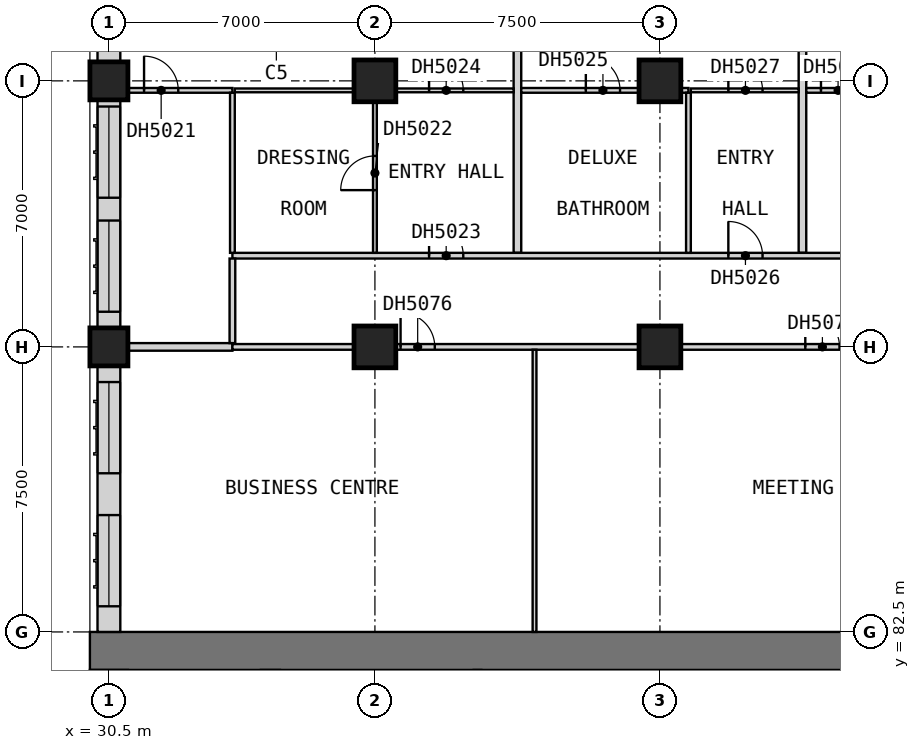
"""IFC4 building model, lengths in metres.
Left out: names, types, materials, properties, quantities, classifications, styles, units other than length and angle.
Written with IfcOpenShell. Run it as: python <this file> out.ifc"""

import sys

from ifc_helpers import new_model, si_unit, direction, frame, frame_2d, origin, origin_2d, place, context, subcontext, project, spatial, rectangle, extrude, element, fill, save


model = new_model("IFC4")
c1 = context("Model", 3, precision=1e-05, world=origin(), true_north=direction((0.0, 1.0)))
c2 = subcontext(c1, "Body", "Model", "MODEL_VIEW")
j1 = project(units=[si_unit("LENGTHUNIT", "METRE"), si_unit("PLANEANGLEUNIT", "RADIAN")], contexts=[c1])
p1 = place(None, origin())
s1 = spatial("IfcSite", under=j1, at=p1, CompositionType="ELEMENT")
p2 = place(p1, origin())
s2 = spatial("IfcBuilding", under=s1, at=p2, CompositionType="ELEMENT")
p3 = place(p2, frame((0.0, 0.0, 79.1)))
s3 = spatial("IfcBuildingStorey", under=s2, at=p3, CompositionType="ELEMENT", Elevation=79.1)
for number, where, z_axis, x_axis in (
    (1, (30.5, 90.0, 0.0), (0.0, 0.0, 1.0), (1.0, 0.0, 0.0)),
    (2, (30.5, 97.0, 0.0), (0.0, 0.0, 1.0), (1.0, 0.0, 0.0)),
):
    element("IfcColumn", number, at=place(p3, frame(where, z_axis=z_axis, x_axis=x_axis)), inside=s3, PredefinedType="COLUMN", context=c2, shape_type="SweptSolid", body=[
        extrude(rectangle(XDim=1.0, YDim=1.0, at=origin_2d()), origin(), (0.0, 0.0, 1.0), 3.6),
    ])
for number, where, z_axis, x_axis in (
    (3, (37.5, 90.0, 0.0), (0.0, 0.0, 1.0), (1.0, 0.0, 0.0)),
    (4, (37.5, 97.0, 0.0), (0.0, 0.0, 1.0), (1.0, 0.0, 0.0)),
    (5, (45.0, 90.0, 0.0), (0.0, 0.0, 1.0), (1.0, 0.0, 0.0)),
    (6, (45.0, 97.0, 0.0), (0.0, 0.0, 1.0), (1.0, 0.0, 0.0)),
):
    element("IfcColumn", number, at=place(p3, frame(where, z_axis=z_axis, x_axis=x_axis)), inside=s3, PredefinedType="COLUMN", context=c2, shape_type="SweptSolid", body=[
        extrude(rectangle(XDim=1.1, YDim=1.1, at=origin_2d()), origin(), (0.0, 0.0, 1.0), 3.6),
    ])
p4 = place(p3, frame((30.0, 82.0, 0.0), z_axis=(0.0, 0.0, 1.0), x_axis=(1.0, 0.0, 0.0)))
e7 = element("IfcWall", 7, at=p4, inside=s3, PredefinedType="SHEAR", context=c2, shape_type="SweptSolid", body=[
    extrude(rectangle(XDim=30.0, YDim=1.0, at=frame_2d((15.0, 0.0))), origin(), (0.0, 0.0, 1.0), 3.6),
])
p5 = place(p3, frame((34.75, 78.3, 0.0), z_axis=(0.0, 0.0, 1.0), x_axis=(0.0, 1.0, 0.0)))
e8 = element("IfcWall", 8, at=p5, inside=s3, PredefinedType="SHEAR", context=c2, shape_type="SweptSolid", body=[
    extrude(rectangle(XDim=3.2, YDim=0.5, at=frame_2d((1.6, 0.0))), origin(), (0.0, 0.0, 1.0), 3.6),
])
p6 = place(p3, frame((30.5, 102.0, 0.0), z_axis=(0.0, 0.0, 1.0), x_axis=(0.0, -1.0, 0.0)))
e9 = element("IfcWall", 9, at=p6, inside=s3, PredefinedType="SOLIDWALL", context=c2, shape_type="SweptSolid", body=[
    extrude(rectangle(XDim=4.5, YDim=0.6, at=frame_2d((2.25, 0.0))), origin(), (0.0, 0.0, 1.0), 2.85),
])
p7 = place(p6, frame((1.5, 0.0, 0.8)))
e10 = element("IfcOpeningElement", 10, at=p7, cuts=e9, PredefinedType="OPENING", context=c2, shape_type="SweptSolid", body=[
    extrude(rectangle(XDim=2.4, YDim=1.8, at=frame_2d((1.2, 0.9))), frame((0.0, 0.31, 0.0), z_axis=(0.0, -1.0, 0.0), x_axis=(1.0, 0.0, 0.0)), (0.0, 0.0, 1.0), 0.62),
])
p8 = place(p3, frame((30.5, 96.5, 0.0), z_axis=(0.0, 0.0, 1.0), x_axis=(0.0, -1.0, 0.0)))
e11 = element("IfcWall", 11, at=p8, inside=s3, PredefinedType="SOLIDWALL", context=c2, shape_type="SweptSolid", body=[
    extrude(rectangle(XDim=6.0, YDim=0.6, at=frame_2d((3.0, 0.0))), origin(), (0.0, 0.0, 1.0), 2.85),
])
p9 = place(p8, frame((3.175, 0.0, 0.8)))
e12 = element("IfcOpeningElement", 12, at=p9, cuts=e11, PredefinedType="OPENING", context=c2, shape_type="SweptSolid", body=[
    extrude(rectangle(XDim=2.4, YDim=1.8, at=frame_2d((1.2, 0.9))), frame((0.0, 0.31, 0.0), z_axis=(0.0, -1.0, 0.0), x_axis=(1.0, 0.0, 0.0)), (0.0, 0.0, 1.0), 0.62),
])
p10 = place(p8, frame((0.175, 0.0, 0.8)))
e13 = element("IfcOpeningElement", 13, at=p10, cuts=e11, PredefinedType="OPENING", context=c2, shape_type="SweptSolid", body=[
    extrude(rectangle(XDim=2.4, YDim=1.8, at=frame_2d((1.2, 0.9))), frame((0.0, 0.31, 0.0), z_axis=(0.0, -1.0, 0.0), x_axis=(1.0, 0.0, 0.0)), (0.0, 0.0, 1.0), 0.62),
])
p11 = place(p3, frame((30.5, 89.5, 0.0), z_axis=(0.0, 0.0, 1.0), x_axis=(0.0, -1.0, 0.0)))
e14 = element("IfcWall", 14, at=p11, inside=s3, PredefinedType="SOLIDWALL", context=c2, shape_type="SweptSolid", body=[
    extrude(rectangle(XDim=7.0, YDim=0.6, at=frame_2d((3.5, 0.0))), origin(), (0.0, 0.0, 1.0), 3.35),
])
p12 = place(p11, frame((3.925, 0.0, 0.8)))
e15 = element("IfcOpeningElement", 15, at=p12, cuts=e14, PredefinedType="OPENING", context=c2, shape_type="SweptSolid", body=[
    extrude(rectangle(XDim=2.4, YDim=1.8, at=frame_2d((1.2, 0.9))), frame((0.0, 0.31, 0.0), z_axis=(0.0, -1.0, 0.0), x_axis=(1.0, 0.0, 0.0)), (0.0, 0.0, 1.0), 0.62),
])
p13 = place(p11, frame((0.425, 0.0, 0.8)))
e16 = element("IfcOpeningElement", 16, at=p13, cuts=e14, PredefinedType="OPENING", context=c2, shape_type="SweptSolid", body=[
    extrude(rectangle(XDim=2.4, YDim=1.8, at=frame_2d((1.2, 0.9))), frame((0.0, 0.31, 0.0), z_axis=(0.0, -1.0, 0.0), x_axis=(1.0, 0.0, 0.0)), (0.0, 0.0, 1.0), 0.62),
])
p14 = place(p3, frame((30.0, 90.0, 0.0), z_axis=(0.0, 0.0, 1.0), x_axis=(1.0, 0.0, 0.0)))
e17 = element("IfcWall", 17, at=p14, inside=s3, PredefinedType="PARTITIONING", context=c2, shape_type="SweptSolid", body=[
    extrude(rectangle(XDim=3.75, YDim=0.2, at=frame_2d((1.875, 0.0))), origin(), (0.0, 0.0, 1.0), 3.35),
])
for number, where, z_axis, x_axis in (
    (18, (41.25, 92.475, 0.0), (0.0, 0.0, 1.0), (0.0, 1.0, 0.0)),
    (19, (48.75, 92.475, 0.0), (0.0, 0.0, 1.0), (0.0, 1.0, 0.0)),
):
    element("IfcWall", number, at=place(p3, frame(where, z_axis=z_axis, x_axis=x_axis)), inside=s3, PredefinedType="PARTITIONING", context=c2, shape_type="SweptSolid", body=[
        extrude(rectangle(XDim=11.715, YDim=0.2, at=frame_2d((5.857, 0.0))), origin(), (0.0, 0.0, 1.0), 3.35),
    ])
p15 = place(p3, frame((33.75, 90.0, 0.0), z_axis=(0.0, 0.0, 1.0), x_axis=(1.0, 0.0, 0.0)))
e20 = element("IfcWall", 20, at=p15, inside=s3, PredefinedType="PARTITIONING", context=c2, shape_type="SweptSolid", body=[
    extrude(rectangle(XDim=41.25, YDim=0.15, at=frame_2d((20.625, 0.0))), origin(), (0.0, 0.0, 1.0), 3.35),
])
p16 = place(p15, frame((4.425, 0.0, 0.0)))
e21 = element("IfcOpeningElement", 21, at=p16, cuts=e20, PredefinedType="OPENING", context=c2, shape_type="SweptSolid", body=[
    extrude(rectangle(XDim=0.9, YDim=2.1, at=frame_2d((0.45, 1.05))), frame((0.0, 0.085, 0.0), z_axis=(0.0, -1.0, 0.0), x_axis=(1.0, 0.0, 0.0)), (0.0, 0.0, 1.0), 0.17),
])
p17 = place(p15, frame((15.075, 0.0, 0.0)))
e22 = element("IfcOpeningElement", 22, at=p17, cuts=e20, PredefinedType="OPENING", context=c2, shape_type="SweptSolid", body=[
    extrude(rectangle(XDim=0.9, YDim=2.1, at=frame_2d((0.45, 1.05))), frame((0.0, 0.085, 0.0), z_axis=(0.0, -1.0, 0.0), x_axis=(1.0, 0.0, 0.0)), (0.0, 0.0, 1.0), 0.17),
])
p18 = place(p15, frame((27.975, 0.0, 0.0)))
e23 = element("IfcOpeningElement", 23, at=p18, cuts=e20, PredefinedType="OPENING", context=c2, shape_type="SweptSolid", body=[
    extrude(rectangle(XDim=0.9, YDim=2.1, at=frame_2d((0.45, 1.05))), frame((0.0, 0.085, 0.0), z_axis=(0.0, -1.0, 0.0), x_axis=(1.0, 0.0, 0.0)), (0.0, 0.0, 1.0), 0.17),
])
p19 = place(p3, frame((33.75, 92.4, 0.0), z_axis=(0.0, 0.0, 1.0), x_axis=(1.0, 0.0, 0.0)))
e24 = element("IfcWall", 24, at=p19, inside=s3, PredefinedType="PARTITIONING", context=c2, shape_type="SweptSolid", body=[
    extrude(rectangle(XDim=43.65, YDim=0.15, at=frame_2d((21.825, 0.0))), origin(), (0.0, 0.0, 1.0), 3.35),
])
p20 = place(p19, frame((5.175, 0.0, 0.0)))
e25 = element("IfcOpeningElement", 25, at=p20, cuts=e24, PredefinedType="OPENING", context=c2, shape_type="SweptSolid", body=[
    extrude(rectangle(XDim=0.9, YDim=2.1, at=frame_2d((0.45, 1.05))), frame((0.0, 0.085, 0.0), z_axis=(0.0, -1.0, 0.0), x_axis=(1.0, 0.0, 0.0)), (0.0, 0.0, 1.0), 0.17),
])
p21 = place(p19, frame((13.05, 0.0, 0.0)))
e26 = element("IfcOpeningElement", 26, at=p21, cuts=e24, PredefinedType="OPENING", context=c2, shape_type="SweptSolid", body=[
    extrude(rectangle(XDim=0.9, YDim=2.1, at=frame_2d((0.45, 1.05))), frame((0.0, 0.085, 0.0), z_axis=(0.0, -1.0, 0.0), x_axis=(1.0, 0.0, 0.0)), (0.0, 0.0, 1.0), 0.17),
])
p22 = place(p19, frame((17.363, 0.0, 0.0)))
e27 = element("IfcOpeningElement", 27, at=p22, cuts=e24, PredefinedType="OPENING", context=c2, shape_type="SweptSolid", body=[
    extrude(rectangle(XDim=0.9, YDim=2.1, at=frame_2d((0.45, 1.05))), frame((0.0, 0.085, 0.0), z_axis=(0.0, -1.0, 0.0), x_axis=(1.0, 0.0, 0.0)), (0.0, 0.0, 1.0), 0.17),
])
p23 = place(p19, frame((24.3, 0.0, 0.0)))
e28 = element("IfcOpeningElement", 28, at=p23, cuts=e24, PredefinedType="OPENING", context=c2, shape_type="SweptSolid", body=[
    extrude(rectangle(XDim=0.9, YDim=2.1, at=frame_2d((0.45, 1.05))), frame((0.0, 0.085, 0.0), z_axis=(0.0, -1.0, 0.0), x_axis=(1.0, 0.0, 0.0)), (0.0, 0.0, 1.0), 0.17),
])
p24 = place(p19, frame((28.613, 0.0, 0.0)))
e29 = element("IfcOpeningElement", 29, at=p24, cuts=e24, PredefinedType="OPENING", context=c2, shape_type="SweptSolid", body=[
    extrude(rectangle(XDim=0.9, YDim=2.1, at=frame_2d((0.45, 1.05))), frame((0.0, 0.085, 0.0), z_axis=(0.0, -1.0, 0.0), x_axis=(1.0, 0.0, 0.0)), (0.0, 0.0, 1.0), 0.17),
])
p25 = place(p19, frame((32.363, 0.0, 0.0)))
e30 = element("IfcOpeningElement", 30, at=p25, cuts=e24, PredefinedType="OPENING", context=c2, shape_type="SweptSolid", body=[
    extrude(rectangle(XDim=0.9, YDim=2.1, at=frame_2d((0.45, 1.05))), frame((0.0, 0.085, 0.0), z_axis=(0.0, -1.0, 0.0), x_axis=(1.0, 0.0, 0.0)), (0.0, 0.0, 1.0), 0.17),
])
p26 = place(p19, frame((39.438, 0.0, 0.0)))
e31 = element("IfcOpeningElement", 31, at=p26, cuts=e24, PredefinedType="OPENING", context=c2, shape_type="SweptSolid", body=[
    extrude(rectangle(XDim=1.0, YDim=2.1, at=frame_2d((0.5, 1.05))), frame((0.0, 0.085, 0.0), z_axis=(0.0, -1.0, 0.0), x_axis=(1.0, 0.0, 0.0)), (0.0, 0.0, 1.0), 0.17),
])
p27 = place(p19, frame((42.0, 0.0, 0.0)))
e32 = element("IfcOpeningElement", 32, at=p27, cuts=e24, PredefinedType="OPENING", context=c2, shape_type="SweptSolid", body=[
    extrude(rectangle(XDim=0.9, YDim=2.1, at=frame_2d((0.45, 1.05))), frame((0.0, 0.085, 0.0), z_axis=(0.0, -1.0, 0.0), x_axis=(1.0, 0.0, 0.0)), (0.0, 0.0, 1.0), 0.17),
])
p28 = place(p3, frame((33.75, 90.1, 0.0), z_axis=(0.0, 0.0, 1.0), x_axis=(0.0, 1.0, 0.0)))
e33 = element("IfcWall", 33, at=p28, inside=s3, PredefinedType="PARTITIONING", context=c2, shape_type="SweptSolid", body=[
    extrude(rectangle(XDim=2.225, YDim=0.15, at=frame_2d((1.112, 0.0))), origin(), (0.0, 0.0, 1.0), 3.35),
])
p29 = place(p3, frame((33.812, 96.75, 0.0), z_axis=(0.0, 0.0, 1.0), x_axis=(1.0, 0.0, 0.0)))
e34 = element("IfcWall", 34, at=p29, inside=s3, PredefinedType="PARTITIONING", context=c2, shape_type="SweptSolid", body=[
    extrude(rectangle(XDim=7.337, YDim=0.1, at=frame_2d((3.669, 0.0))), origin(), (0.0, 0.0, 1.0), 3.35),
])
p30 = place(p29, frame((5.113, 0.0, 0.0)))
e35 = element("IfcOpeningElement", 35, at=p30, cuts=e34, PredefinedType="OPENING", context=c2, shape_type="SweptSolid", body=[
    extrude(rectangle(XDim=0.9, YDim=2.1, at=frame_2d((0.45, 1.05))), frame((0.0, 0.06, 0.0), z_axis=(0.0, -1.0, 0.0), x_axis=(1.0, 0.0, 0.0)), (0.0, 0.0, 1.0), 0.12),
])
p31 = place(p3, frame((45.812, 96.75, 0.0), z_axis=(0.0, 0.0, 1.0), x_axis=(1.0, 0.0, 0.0)))
e36 = element("IfcWall", 36, at=p31, inside=s3, PredefinedType="PARTITIONING", context=c2, shape_type="SweptSolid", body=[
    extrude(rectangle(XDim=2.837, YDim=0.1, at=frame_2d((1.419, 0.0))), origin(), (0.0, 0.0, 1.0), 3.35),
])
p32 = place(p31, frame((0.988, 0.0, 0.0)))
e37 = element("IfcOpeningElement", 37, at=p32, cuts=e36, PredefinedType="OPENING", context=c2, shape_type="SweptSolid", body=[
    extrude(rectangle(XDim=0.9, YDim=2.1, at=frame_2d((0.45, 1.05))), frame((0.0, 0.06, 0.0), z_axis=(0.0, -1.0, 0.0), x_axis=(1.0, 0.0, 0.0)), (0.0, 0.0, 1.0), 0.12),
])
p33 = place(p3, frame((37.5, 92.475, 0.0), z_axis=(0.0, 0.0, 1.0), x_axis=(0.0, 1.0, 0.0)))
e38 = element("IfcWall", 38, at=p33, inside=s3, PredefinedType="PARTITIONING", context=c2, shape_type="SweptSolid", body=[
    extrude(rectangle(XDim=4.225, YDim=0.1, at=frame_2d((2.112, 0.0))), origin(), (0.0, 0.0, 1.0), 3.35),
])
p34 = place(p33, frame((1.65, 0.0, 0.0)))
e39 = element("IfcOpeningElement", 39, at=p34, cuts=e38, PredefinedType="OPENING", context=c2, shape_type="SweptSolid", body=[
    extrude(rectangle(XDim=0.9, YDim=2.1, at=frame_2d((0.45, 1.05))), frame((0.0, 0.06, 0.0), z_axis=(0.0, -1.0, 0.0), x_axis=(1.0, 0.0, 0.0)), (0.0, 0.0, 1.0), 0.12),
])
p35 = place(p3, frame((41.7, 82.5, 0.0), z_axis=(0.0, 0.0, 1.0), x_axis=(0.0, 1.0, 0.0)))
e40 = element("IfcWall", 40, at=p35, inside=s3, PredefinedType="PARTITIONING", context=c2, shape_type="SweptSolid", body=[
    extrude(rectangle(XDim=7.425, YDim=0.1, at=frame_2d((3.712, 0.0))), origin(), (0.0, 0.0, 1.0), 3.35),
])
p36 = place(p3, frame((30.0, 96.75, 0.0), z_axis=(0.0, 0.0, 1.0), x_axis=(1.0, 0.0, 0.0)))
e41 = element("IfcWall", 41, at=p36, inside=s3, PredefinedType="PARTITIONING", context=c2, shape_type="SweptSolid", body=[
    extrude(rectangle(XDim=3.75, YDim=0.125, at=frame_2d((1.875, 0.0))), origin(), (0.0, 0.0, 1.0), 3.35),
])
p37 = place(p36, frame((1.425, 0.0, 0.0)))
e42 = element("IfcOpeningElement", 42, at=p37, cuts=e41, PredefinedType="OPENING", context=c2, shape_type="SweptSolid", body=[
    extrude(rectangle(XDim=0.9, YDim=2.1, at=frame_2d((0.45, 1.05))), frame((0.0, 0.073, 0.0), z_axis=(0.0, -1.0, 0.0), x_axis=(1.0, 0.0, 0.0)), (0.0, 0.0, 1.0), 0.145),
])
p38 = place(p3, frame((41.35, 96.75, 0.0), z_axis=(0.0, 0.0, 1.0), x_axis=(1.0, 0.0, 0.0)))
e43 = element("IfcWall", 43, at=p38, inside=s3, PredefinedType="PARTITIONING", context=c2, shape_type="SweptSolid", body=[
    extrude(rectangle(XDim=4.4, YDim=0.125, at=frame_2d((2.2, 0.0))), origin(), (0.0, 0.0, 1.0), 3.35),
])
p39 = place(p38, frame((1.7, 0.0, 0.0)))
e44 = element("IfcOpeningElement", 44, at=p39, cuts=e43, PredefinedType="OPENING", context=c2, shape_type="SweptSolid", body=[
    extrude(rectangle(XDim=0.9, YDim=2.1, at=frame_2d((0.45, 1.05))), frame((0.0, 0.073, 0.0), z_axis=(0.0, -1.0, 0.0), x_axis=(1.0, 0.0, 0.0)), (0.0, 0.0, 1.0), 0.145),
])
p40 = place(p3, frame((48.85, 96.75, 0.0), z_axis=(0.0, 0.0, 1.0), x_axis=(1.0, 0.0, 0.0)))
e45 = element("IfcWall", 45, at=p40, inside=s3, PredefinedType="PARTITIONING", context=c2, shape_type="SweptSolid", body=[
    extrude(rectangle(XDim=1.775, YDim=0.125, at=frame_2d((0.887, 0.0))), origin(), (0.0, 0.0, 1.0), 3.35),
])
p41 = place(p40, frame((0.387, 0.0, 0.0)))
e46 = element("IfcOpeningElement", 46, at=p41, cuts=e45, PredefinedType="OPENING", context=c2, shape_type="SweptSolid", body=[
    extrude(rectangle(XDim=0.9, YDim=2.1, at=frame_2d((0.45, 1.05))), frame((0.0, 0.073, 0.0), z_axis=(0.0, -1.0, 0.0), x_axis=(1.0, 0.0, 0.0)), (0.0, 0.0, 1.0), 0.145),
])
for number, where, z_axis, x_axis in (
    (47, (33.75, 92.475, 0.0), (0.0, 0.0, 1.0), (0.0, 1.0, 0.0)),
    (48, (45.75, 92.475, 0.0), (0.0, 0.0, 1.0), (0.0, 1.0, 0.0)),
):
    element("IfcWall", number, at=place(p3, frame(where, z_axis=z_axis, x_axis=x_axis)), inside=s3, PredefinedType="PARTITIONING", context=c2, shape_type="SweptSolid", body=[
        extrude(rectangle(XDim=4.212, YDim=0.125, at=frame_2d((2.106, 0.0))), origin(), (0.0, 0.0, 1.0), 3.35),
    ])
p42 = place(p9, origin())
e49 = element("IfcWindow", 49, at=p42, inside=s3, PartitioningType="SINGLE_PANEL", PredefinedType="WINDOW", context=c2, shape_type="SweptSolid", body=[
    extrude(rectangle(XDim=2.4, YDim=1.8, at=frame_2d((1.2, 0.9))), frame((0.0, -0.07, 0.0), z_axis=(0.0, -1.0, 0.0), x_axis=(1.0, 0.0, 0.0)), (0.0, 0.0, 1.0), 0.06),
])
fill(e12, e49)
p43 = place(p10, origin())
e50 = element("IfcWindow", 50, at=p43, inside=s3, PartitioningType="SINGLE_PANEL", PredefinedType="WINDOW", context=c2, shape_type="SweptSolid", body=[
    extrude(rectangle(XDim=2.4, YDim=1.8, at=frame_2d((1.2, 0.9))), frame((0.0, -0.07, 0.0), z_axis=(0.0, -1.0, 0.0), x_axis=(1.0, 0.0, 0.0)), (0.0, 0.0, 1.0), 0.06),
])
fill(e13, e50)
p44 = place(p12, origin())
e51 = element("IfcWindow", 51, at=p44, inside=s3, PartitioningType="SINGLE_PANEL", PredefinedType="WINDOW", context=c2, shape_type="SweptSolid", body=[
    extrude(rectangle(XDim=2.4, YDim=1.8, at=frame_2d((1.2, 0.9))), frame((0.0, -0.07, 0.0), z_axis=(0.0, -1.0, 0.0), x_axis=(1.0, 0.0, 0.0)), (0.0, 0.0, 1.0), 0.06),
])
fill(e15, e51)
p45 = place(p13, origin())
e52 = element("IfcWindow", 52, at=p45, inside=s3, PartitioningType="SINGLE_PANEL", PredefinedType="WINDOW", context=c2, shape_type="SweptSolid", body=[
    extrude(rectangle(XDim=2.4, YDim=1.8, at=frame_2d((1.2, 0.9))), frame((0.0, -0.07, 0.0), z_axis=(0.0, -1.0, 0.0), x_axis=(1.0, 0.0, 0.0)), (0.0, 0.0, 1.0), 0.06),
])
fill(e16, e52)
p46 = place(p37, origin())
e53 = element("IfcDoor", 53, at=p46, inside=s3, OperationType="SINGLE_SWING_RIGHT", PredefinedType="DOOR", context=c2, shape_type="SweptSolid", body=[
    extrude(rectangle(XDim=0.9, YDim=2.1, at=frame_2d((0.45, 1.05))), frame((0.0, 0.025, 0.0), z_axis=(0.0, -1.0, 0.0), x_axis=(1.0, 0.0, 0.0)), (0.0, 0.0, 1.0), 0.05),
])
fill(e42, e53)
p47 = place(p34, origin())
e54 = element("IfcDoor", 54, at=p47, inside=s3, OperationType="SINGLE_SWING_RIGHT", PredefinedType="DOOR", context=c2, shape_type="SweptSolid", body=[
    extrude(rectangle(XDim=0.9, YDim=2.1, at=frame_2d((0.45, 1.05))), frame((0.0, 0.025, 0.0), z_axis=(0.0, -1.0, 0.0), x_axis=(1.0, 0.0, 0.0)), (0.0, 0.0, 1.0), 0.05),
])
fill(e39, e54)
p48 = place(p20, origin())
e55 = element("IfcDoor", 55, at=p48, inside=s3, OperationType="SINGLE_SWING_LEFT", PredefinedType="DOOR", context=c2, shape_type="SweptSolid", body=[
    extrude(rectangle(XDim=0.9, YDim=2.1, at=frame_2d((0.45, 1.05))), frame((0.0, 0.025, 0.0), z_axis=(0.0, -1.0, 0.0), x_axis=(1.0, 0.0, 0.0)), (0.0, 0.0, 1.0), 0.05),
])
fill(e25, e55)
p49 = place(p30, origin())
e56 = element("IfcDoor", 56, at=p49, inside=s3, OperationType="SINGLE_SWING_RIGHT", PredefinedType="DOOR", context=c2, shape_type="SweptSolid", body=[
    extrude(rectangle(XDim=0.9, YDim=2.1, at=frame_2d((0.45, 1.05))), frame((0.0, 0.025, 0.0), z_axis=(0.0, -1.0, 0.0), x_axis=(1.0, 0.0, 0.0)), (0.0, 0.0, 1.0), 0.05),
])
fill(e35, e56)
p50 = place(p39, origin())
e57 = element("IfcDoor", 57, at=p50, inside=s3, OperationType="SINGLE_SWING_RIGHT", PredefinedType="DOOR", context=c2, shape_type="SweptSolid", body=[
    extrude(rectangle(XDim=0.9, YDim=2.1, at=frame_2d((0.45, 1.05))), frame((0.0, 0.025, 0.0), z_axis=(0.0, -1.0, 0.0), x_axis=(1.0, 0.0, 0.0)), (0.0, 0.0, 1.0), 0.05),
])
fill(e44, e57)
p51 = place(p21, origin())
e58 = element("IfcDoor", 58, at=p51, inside=s3, OperationType="SINGLE_SWING_LEFT", PredefinedType="DOOR", context=c2, shape_type="SweptSolid", body=[
    extrude(rectangle(XDim=0.9, YDim=2.1, at=frame_2d((0.45, 1.05))), frame((0.0, 0.025, 0.0), z_axis=(0.0, -1.0, 0.0), x_axis=(1.0, 0.0, 0.0)), (0.0, 0.0, 1.0), 0.05),
])
fill(e26, e58)
p52 = place(p32, origin())
e59 = element("IfcDoor", 59, at=p52, inside=s3, OperationType="SINGLE_SWING_RIGHT", PredefinedType="DOOR", context=c2, shape_type="SweptSolid", body=[
    extrude(rectangle(XDim=0.9, YDim=2.1, at=frame_2d((0.45, 1.05))), frame((0.0, 0.025, 0.0), z_axis=(0.0, -1.0, 0.0), x_axis=(1.0, 0.0, 0.0)), (0.0, 0.0, 1.0), 0.05),
])
fill(e37, e59)
p53 = place(p41, origin())
e60 = element("IfcDoor", 60, at=p53, inside=s3, OperationType="SINGLE_SWING_RIGHT", PredefinedType="DOOR", context=c2, shape_type="SweptSolid", body=[
    extrude(rectangle(XDim=0.9, YDim=2.1, at=frame_2d((0.45, 1.05))), frame((0.0, 0.025, 0.0), z_axis=(0.0, -1.0, 0.0), x_axis=(1.0, 0.0, 0.0)), (0.0, 0.0, 1.0), 0.05),
])
fill(e46, e60)
p54 = place(p16, origin())
e61 = element("IfcDoor", 61, at=p54, inside=s3, OperationType="SINGLE_SWING_LEFT", PredefinedType="DOOR", context=c2, shape_type="SweptSolid", body=[
    extrude(rectangle(XDim=0.9, YDim=2.1, at=frame_2d((0.45, 1.05))), frame((0.0, 0.025, 0.0), z_axis=(0.0, -1.0, 0.0), x_axis=(1.0, 0.0, 0.0)), (0.0, 0.0, 1.0), 0.05),
])
fill(e21, e61)
p55 = place(p17, origin())
e62 = element("IfcDoor", 62, at=p55, inside=s3, OperationType="SINGLE_SWING_RIGHT", PredefinedType="DOOR", context=c2, shape_type="SweptSolid", body=[
    extrude(rectangle(XDim=0.9, YDim=2.1, at=frame_2d((0.45, 1.05))), frame((0.0, 0.025, 0.0), z_axis=(0.0, -1.0, 0.0), x_axis=(1.0, 0.0, 0.0)), (0.0, 0.0, 1.0), 0.05),
])
fill(e22, e62)
save(model, sys.argv[1])
